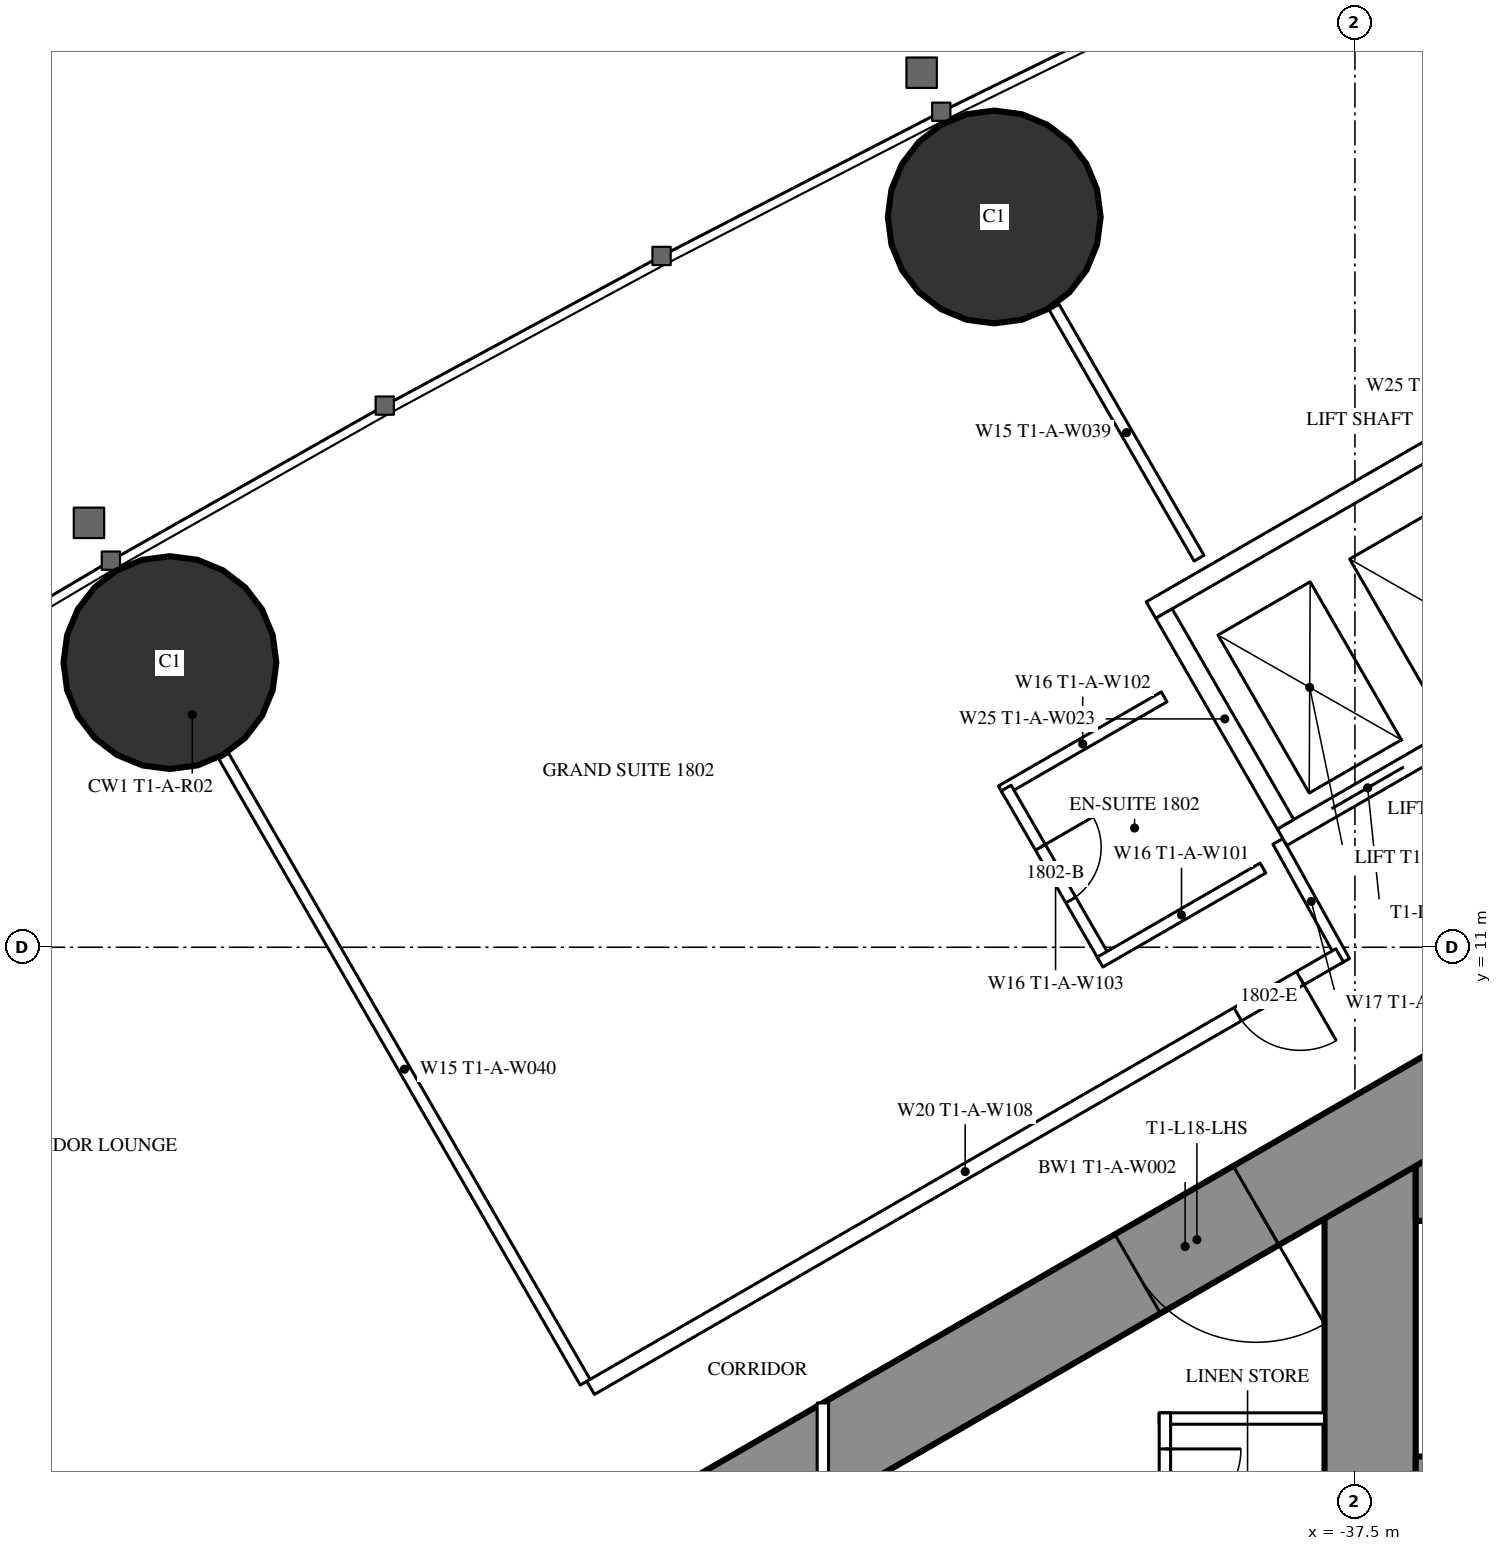
"""IFC4 building model, lengths in metres.
Left out: names, types, materials, properties, quantities, classifications, styles, units other than length and angle.
Written with IfcOpenShell. Run it as: python <this file> out.ifc"""

import sys

from ifc_helpers import new_model, si_unit, direction, frame, frame_2d, origin, origin_2d, place, context, subcontext, project, spatial, rectangle, hollow_circle, extrude, element, fill, save


model = new_model("IFC4")
c1 = context("Model", 3, precision=1e-05, world=origin(), true_north=direction((0.0, 1.0)))
c2 = subcontext(c1, "Body", "Model", "MODEL_VIEW")
j1 = project(units=[si_unit("LENGTHUNIT", "METRE"), si_unit("PLANEANGLEUNIT", "RADIAN")], contexts=[c1])
p1 = place(None, origin())
s1 = spatial("IfcSite", under=j1, at=p1, CompositionType="ELEMENT")
p2 = place(p1, origin())
s2 = spatial("IfcBuilding", under=s1, at=p2, CompositionType="ELEMENT")
p3 = place(p2, frame((0.0, 0.0, 70.5)))
s3 = spatial("IfcBuildingStorey", under=s2, at=p3, CompositionType="ELEMENT", Elevation=70.5)
for number, where, z_axis, x_axis in (
    (1, (-42.245, 20.607, 0.0), (0.0, 0.0, 1.0), (1.0, 0.0, 0.0)),
    (2, (-53.09, 14.745, 0.0), (0.0, 0.0, 1.0), (1.0, 0.0, 0.0)),
):
    element("IfcColumn", number, at=place(p3, frame(where, z_axis=z_axis, x_axis=x_axis)), inside=s3, PredefinedType="COLUMN", context=c2, shape_type="SweptSolid", body=[
        extrude(hollow_circle(Radius=1.4, WallThickness=0.12, at=origin_2d()), origin(), (0.0, 0.0, 1.0), 3.5),
    ])
p4 = place(p3, frame((-37.3, 8.6, 0.0), z_axis=(0.0, 0.0, 1.0), x_axis=(0.0, -1.0, 0.0)))
e3 = element("IfcWall", 3, at=p4, inside=s3, PredefinedType="SHEAR", context=c2, shape_type="SweptSolid", body=[
    extrude(rectangle(XDim=17.2, YDim=1.2, at=frame_2d((8.6, 0.0))), origin(), (0.0, 0.0, 1.0), 3.5),
])
p5 = place(p4, frame((7.7, 0.0, 0.0)))
e4 = element("IfcOpeningElement", 4, at=p5, cuts=e3, PredefinedType="OPENING", context=c2, shape_type="SweptSolid", body=[
    extrude(rectangle(XDim=1.8, YDim=2.2, at=frame_2d((0.9, 1.1))), frame((0.0, 0.61, 0.0), z_axis=(0.0, -1.0, 0.0), x_axis=(1.0, 0.0, 0.0)), (0.0, 0.0, 1.0), 1.22),
])
p6 = place(p3, frame((-28.3, 8.0, 0.0), z_axis=(0.0, 0.0, 1.0), x_axis=(-1.0, 0.0, 0.0)))
e5 = element("IfcWall", 5, at=p6, inside=s3, PredefinedType="SHEAR", context=c2, shape_type="SweptSolid", body=[
    extrude(rectangle(XDim=8.4, YDim=1.2, at=frame_2d((4.2, 0.0))), origin(), (0.0, 0.0, 1.0), 3.5),
])
p7 = place(p6, frame((0.25, 0.0, 0.0)))
e6 = element("IfcOpeningElement", 6, at=p7, cuts=e5, PredefinedType="OPENING", context=c2, shape_type="SweptSolid", body=[
    extrude(rectangle(XDim=1.0, YDim=2.2, at=frame_2d((0.5, 1.1))), frame((0.0, 0.61, 0.0), z_axis=(0.0, -1.0, 0.0), x_axis=(1.0, 0.0, 0.0)), (0.0, 0.0, 1.0), 1.22),
])
p8 = place(p3, frame((-28.3, 4.15, 0.0), z_axis=(0.0, 0.0, 1.0), x_axis=(-1.0, 0.0, 0.0)))
e7 = element("IfcWall", 7, at=p8, inside=s3, PredefinedType="SHEAR", context=c2, shape_type="SweptSolid", body=[
    extrude(rectangle(XDim=8.4, YDim=0.3, at=frame_2d((4.2, 0.0))), origin(), (0.0, 0.0, 1.0), 3.5),
])
p9 = place(p3, frame((-27.2, 14.3, 0.0), z_axis=(0.0, 0.0, 1.0), x_axis=(-0.866026593062, -0.499997940104, 0.0)))
e8 = element("IfcWall", 8, at=p9, inside=s3, PredefinedType="SHEAR", context=c2, shape_type="SweptSolid", body=[
    extrude(rectangle(XDim=28.946, YDim=1.2, at=frame_2d((14.473, 0.0))), origin(), (0.0, 0.0, 1.0), 3.5),
])
p10 = place(p9, frame((4.6, 0.0, 0.0)))
e9 = element("IfcOpeningElement", 9, at=p10, cuts=e8, PredefinedType="OPENING", context=c2, shape_type="SweptSolid", body=[
    extrude(rectangle(XDim=1.0, YDim=2.2, at=frame_2d((0.5, 1.1))), frame((0.0, 0.61, 0.0), z_axis=(0.0, -1.0, 0.0), x_axis=(1.0, 0.0, 0.0)), (0.0, 0.0, 1.0), 1.22),
])
p11 = place(p9, frame((13.395, 0.0, 0.0)))
e10 = element("IfcOpeningElement", 10, at=p11, cuts=e8, PredefinedType="OPENING", context=c2, shape_type="SweptSolid", body=[
    extrude(rectangle(XDim=1.8, YDim=2.2, at=frame_2d((0.9, 1.1))), frame((0.0, 0.61, 0.0), z_axis=(0.0, -1.0, 0.0), x_axis=(1.0, 0.0, 0.0)), (0.0, 0.0, 1.0), 1.22),
])
p12 = place(p3, frame((-47.627, 5.278, 0.0), z_axis=(0.0, 0.0, 1.0), x_axis=(-0.500009844318, 0.86601972009, 0.0)))
e11 = element("IfcWall", 11, at=p12, inside=s3, PredefinedType="PARTITIONING", context=c2, shape_type="SweptSolid", body=[
    extrude(rectangle(XDim=9.51, YDim=0.15, at=frame_2d((4.755, 0.0))), origin(), (0.0, 0.0, 1.0), 2.25),
])
p13 = place(p3, frame((-39.551, 16.119, 0.0), z_axis=(0.0, 0.0, 1.0), x_axis=(-0.500014214979, 0.866017196607, 0.0)))
e12 = element("IfcWall", 12, at=p13, inside=s3, PredefinedType="PARTITIONING", context=c2, shape_type="SweptSolid", body=[
    extrude(rectangle(XDim=3.815, YDim=0.15, at=frame_2d((1.907, 0.0))), origin(), (0.0, 0.0, 1.0), 3.25),
])
p14 = place(p3, frame((-38.513, 12.392, 0.0), z_axis=(0.0, 0.0, 1.0), x_axis=(0.485585508183, -0.874189175317, 0.0)))
e13 = element("IfcWall", 13, at=p14, inside=s3, PredefinedType="PARTITIONING", context=c2, shape_type="SweptSolid", body=[
    extrude(rectangle(XDim=1.805, YDim=0.15, at=frame_2d((0.902, 0.0))), origin(), (0.0, 0.0, 1.0), 3.25),
])
p15 = place(p3, frame((-37.7, 10.894, 0.0), z_axis=(0.0, 0.0, 1.0), x_axis=(-0.866024459167, -0.500001636122, 0.0)))
e14 = element("IfcWall", 14, at=p15, inside=s3, PredefinedType="PARTITIONING", context=c2, shape_type="SweptSolid", body=[
    extrude(rectangle(XDim=11.38, YDim=0.2, at=frame_2d((5.69, 0.0))), origin(), (0.0, 0.0, 1.0), 3.25),
])
p16 = place(p15, frame((0.6, 0.0, 0.0)))
e15 = element("IfcOpeningElement", 15, at=p16, cuts=e14, PredefinedType="OPENING", context=c2, shape_type="SweptSolid", body=[
    extrude(rectangle(XDim=0.95, YDim=2.2, at=frame_2d((0.475, 1.1))), frame((0.0, 0.11, 0.0), z_axis=(0.0, -1.0, 0.0), x_axis=(1.0, 0.0, 0.0)), (0.0, 0.0, 1.0), 0.22),
])
p17 = place(p3, frame((-40.01, 14.294, 0.0), z_axis=(0.0, 0.0, 1.0), x_axis=(-0.866031185235, -0.4999899861, 0.0)))
e16 = element("IfcWall", 16, at=p17, inside=s3, PredefinedType="PARTITIONING", context=c2, shape_type="SweptSolid", body=[
    extrude(rectangle(XDim=2.475, YDim=0.15, at=frame_2d((1.238, 0.0))), origin(), (0.0, 0.0, 1.0), 3.25),
])
p18 = place(p3, frame((-40.788, 10.843, 0.0), z_axis=(0.0, 0.0, 1.0), x_axis=(-0.500006934395, 0.866021400173, 0.0)))
e17 = element("IfcWall", 17, at=p18, inside=s3, PredefinedType="PARTITIONING", context=c2, shape_type="SweptSolid", body=[
    extrude(rectangle(XDim=2.6, YDim=0.15, at=frame_2d((1.3, 0.0))), origin(), (0.0, 0.0, 1.0), 3.25),
])
p19 = place(p18, frame((0.9, 0.0, 0.0)))
e18 = element("IfcOpeningElement", 18, at=p19, cuts=e17, PredefinedType="OPENING", context=c2, shape_type="SweptSolid", body=[
    extrude(rectangle(XDim=0.8, YDim=2.2, at=frame_2d((0.4, 1.1))), frame((0.0, 0.085, 0.0), z_axis=(0.0, -1.0, 0.0), x_axis=(1.0, 0.0, 0.0)), (0.0, 0.0, 1.0), 0.17),
])
p20 = place(p3, frame((-38.71, 12.042, 0.0), z_axis=(0.0, 0.0, 1.0), x_axis=(-0.86604923931, -0.499958713387, 0.0)))
e19 = element("IfcWall", 19, at=p20, inside=s3, PredefinedType="PARTITIONING", context=c2, shape_type="SweptSolid", body=[
    extrude(rectangle(XDim=2.475, YDim=0.15, at=frame_2d((1.237, 0.0))), origin(), (0.0, 0.0, 1.0), 3.25),
])
p21 = place(p3, frame((-37.9, 4.8, 0.0), z_axis=(0.0, 0.0, 1.0), x_axis=(-1.0, 0.0, 0.0)))
e20 = element("IfcWall", 20, at=p21, inside=s3, PredefinedType="PARTITIONING", context=c2, shape_type="SweptSolid", body=[
    extrude(rectangle(XDim=2.175, YDim=0.15, at=frame_2d((1.087, 0.0))), origin(), (0.0, 0.0, 1.0), 3.25),
])
p22 = place(p3, frame((-40.0, 4.875, 0.0), z_axis=(0.0, 0.0, 1.0), x_axis=(0.0, -1.0, 0.0)))
e21 = element("IfcWall", 21, at=p22, inside=s3, PredefinedType="PARTITIONING", context=c2, shape_type="SweptSolid", body=[
    extrude(rectangle(XDim=1.95, YDim=0.15, at=frame_2d((0.975, 0.0))), origin(), (0.0, 0.0, 1.0), 3.25),
])
p23 = place(p22, frame((0.475, 0.0, 0.0)))
e22 = element("IfcOpeningElement", 22, at=p23, cuts=e21, PredefinedType="OPENING", context=c2, shape_type="SweptSolid", body=[
    extrude(rectangle(XDim=1.0, YDim=2.2, at=frame_2d((0.5, 1.1))), frame((0.0, 0.085, 0.0), z_axis=(0.0, -1.0, 0.0), x_axis=(1.0, 0.0, 0.0)), (0.0, 0.0, 1.0), 0.17),
])
p24 = place(p3, frame((-44.5, 5.005, 0.0), z_axis=(0.0, 0.0, 1.0), x_axis=(0.0, -1.0, 0.0)))
e23 = element("IfcWall", 23, at=p24, inside=s3, PredefinedType="PARTITIONING", context=c2, shape_type="SweptSolid", body=[
    extrude(rectangle(XDim=10.009, YDim=0.15, at=frame_2d((5.005, 0.0))), origin(), (0.0, 0.0, 1.0), 2.45),
])
p25 = place(p24, frame((2.002, 0.0, 0.0)))
e24 = element("IfcOpeningElement", 24, at=p25, cuts=e23, PredefinedType="OPENING", context=c2, shape_type="SweptSolid", body=[
    extrude(rectangle(XDim=1.0, YDim=2.2, at=frame_2d((0.5, 1.1))), frame((0.0, 0.085, 0.0), z_axis=(0.0, -1.0, 0.0), x_axis=(1.0, 0.0, 0.0)), (0.0, 0.0, 1.0), 0.17),
])
p26 = place(p24, frame((7.007, 0.0, 0.0)))
e25 = element("IfcOpeningElement", 25, at=p26, cuts=e23, PredefinedType="OPENING", context=c2, shape_type="SweptSolid", body=[
    extrude(rectangle(XDim=1.0, YDim=2.2, at=frame_2d((0.5, 1.1))), frame((0.0, 0.085, 0.0), z_axis=(0.0, -1.0, 0.0), x_axis=(1.0, 0.0, 0.0)), (0.0, 0.0, 1.0), 0.17),
])
p27 = place(p3, frame((-31.01, 16.747, 0.0), z_axis=(0.0, 0.0, 1.0), x_axis=(-0.866028165386, -0.499995216735, 0.0)))
e26 = element("IfcWall", 26, at=p27, inside=s3, PredefinedType="PARTITIONING", context=c2, shape_type="SweptSolid", body=[
    extrude(rectangle(XDim=8.6, YDim=0.25, at=frame_2d((4.3, 0.0))), origin(), (0.0, 0.0, 1.0), 3.25),
])
p28 = place(p27, frame((0.75, 0.0, 0.0)))
e27 = element("IfcOpeningElement", 27, at=p28, cuts=e26, PredefinedType="OPENING", context=c2, shape_type="SweptSolid", body=[
    extrude(rectangle(XDim=1.1, YDim=2.2, at=frame_2d((0.55, 1.1))), frame((0.0, 0.135, 0.0), z_axis=(0.0, -1.0, 0.0), x_axis=(1.0, 0.0, 0.0)), (0.0, 0.0, 1.0), 0.27),
])
p29 = place(p27, frame((2.75, 0.0, 0.0)))
e28 = element("IfcOpeningElement", 28, at=p29, cuts=e26, PredefinedType="OPENING", context=c2, shape_type="SweptSolid", body=[
    extrude(rectangle(XDim=1.1, YDim=2.2, at=frame_2d((0.55, 1.1))), frame((0.0, 0.135, 0.0), z_axis=(0.0, -1.0, 0.0), x_axis=(1.0, 0.0, 0.0)), (0.0, 0.0, 1.0), 0.27),
])
p30 = place(p27, frame((4.75, 0.0, 0.0)))
e29 = element("IfcOpeningElement", 29, at=p30, cuts=e26, PredefinedType="OPENING", context=c2, shape_type="SweptSolid", body=[
    extrude(rectangle(XDim=1.1, YDim=2.2, at=frame_2d((0.55, 1.1))), frame((0.0, 0.135, 0.0), z_axis=(0.0, -1.0, 0.0), x_axis=(1.0, 0.0, 0.0)), (0.0, 0.0, 1.0), 0.27),
])
p31 = place(p27, frame((6.75, 0.0, 0.0)))
e30 = element("IfcOpeningElement", 30, at=p31, cuts=e26, PredefinedType="OPENING", context=c2, shape_type="SweptSolid", body=[
    extrude(rectangle(XDim=1.1, YDim=2.2, at=frame_2d((0.55, 1.1))), frame((0.0, 0.135, 0.0), z_axis=(0.0, -1.0, 0.0), x_axis=(1.0, 0.0, 0.0)), (0.0, 0.0, 1.0), 0.27),
])
p32 = place(p3, frame((-32.736, 19.736, 0.0), z_axis=(0.0, 0.0, 1.0), x_axis=(-0.866028165386, -0.499995216735, 0.0)))
e31 = element("IfcWall", 31, at=p32, inside=s3, PredefinedType="PARTITIONING", context=c2, shape_type="SweptSolid", body=[
    extrude(rectangle(XDim=8.6, YDim=0.25, at=frame_2d((4.3, 0.0))), origin(), (0.0, 0.0, 1.0), 3.25),
])
p33 = place(p3, frame((-38.413, 12.618, 0.0), z_axis=(0.0, 0.0, 1.0), x_axis=(-0.499872130319, 0.866099216793, 0.0)))
e32 = element("IfcWall", 32, at=p33, inside=s3, PredefinedType="PARTITIONING", context=c2, shape_type="SweptSolid", body=[
    extrude(rectangle(XDim=3.2, YDim=0.25, at=frame_2d((1.6, 0.0))), origin(), (0.0, 0.0, 1.0), 3.25),
])
p34 = place(p19, origin())
e33 = element("IfcDoor", 33, at=p34, inside=s3, OperationType="SINGLE_SWING_RIGHT", PredefinedType="DOOR", context=c2, shape_type="SweptSolid", body=[
    extrude(rectangle(XDim=0.8, YDim=2.2, at=frame_2d((0.4, 1.1))), frame((0.0, 0.025, 0.0), z_axis=(0.0, -1.0, 0.0), x_axis=(1.0, 0.0, 0.0)), (0.0, 0.0, 1.0), 0.05),
])
fill(e18, e33)
p35 = place(p16, origin())
e34 = element("IfcDoor", 34, at=p35, inside=s3, OperationType="SINGLE_SWING_LEFT", PredefinedType="DOOR", context=c2, shape_type="SweptSolid", body=[
    extrude(rectangle(XDim=0.95, YDim=2.2, at=frame_2d((0.475, 1.1))), frame((0.0, 0.025, 0.0), z_axis=(0.0, -1.0, 0.0), x_axis=(1.0, 0.0, 0.0)), (0.0, 0.0, 1.0), 0.05),
])
fill(e15, e34)
p36 = place(p23, origin())
e35 = element("IfcDoor", 35, at=p36, inside=s3, OperationType="SINGLE_SWING_LEFT", PredefinedType="DOOR", context=c2, shape_type="SweptSolid", body=[
    extrude(rectangle(XDim=1.0, YDim=2.2, at=frame_2d((0.5, 1.1))), frame((0.0, 0.025, 0.0), z_axis=(0.0, -1.0, 0.0), x_axis=(1.0, 0.0, 0.0)), (0.0, 0.0, 1.0), 0.05),
])
fill(e22, e35)
p37 = place(p11, origin())
e36 = element("IfcDoor", 36, at=p37, inside=s3, OperationType="DOUBLE_DOOR_SINGLE_SWING", PredefinedType="DOOR", context=c2, shape_type="SweptSolid", body=[
    extrude(rectangle(XDim=1.8, YDim=2.2, at=frame_2d((0.9, 1.1))), frame((0.0, 0.025, 0.0), z_axis=(0.0, -1.0, 0.0), x_axis=(1.0, 0.0, 0.0)), (0.0, 0.0, 1.0), 0.05),
])
fill(e10, e36)
p38 = place(p31, origin())
e37 = element("IfcDoor", 37, at=p38, inside=s3, OperationType="DOUBLE_DOOR_SLIDING", PredefinedType="USERDEFINED", context=c2, shape_type="SweptSolid", body=[
    extrude(rectangle(XDim=1.1, YDim=2.2, at=frame_2d((0.55, 1.1))), frame((0.0, 0.025, 0.0), z_axis=(0.0, -1.0, 0.0), x_axis=(1.0, 0.0, 0.0)), (0.0, 0.0, 1.0), 0.05),
])
fill(e30, e37)
save(model, sys.argv[1])
